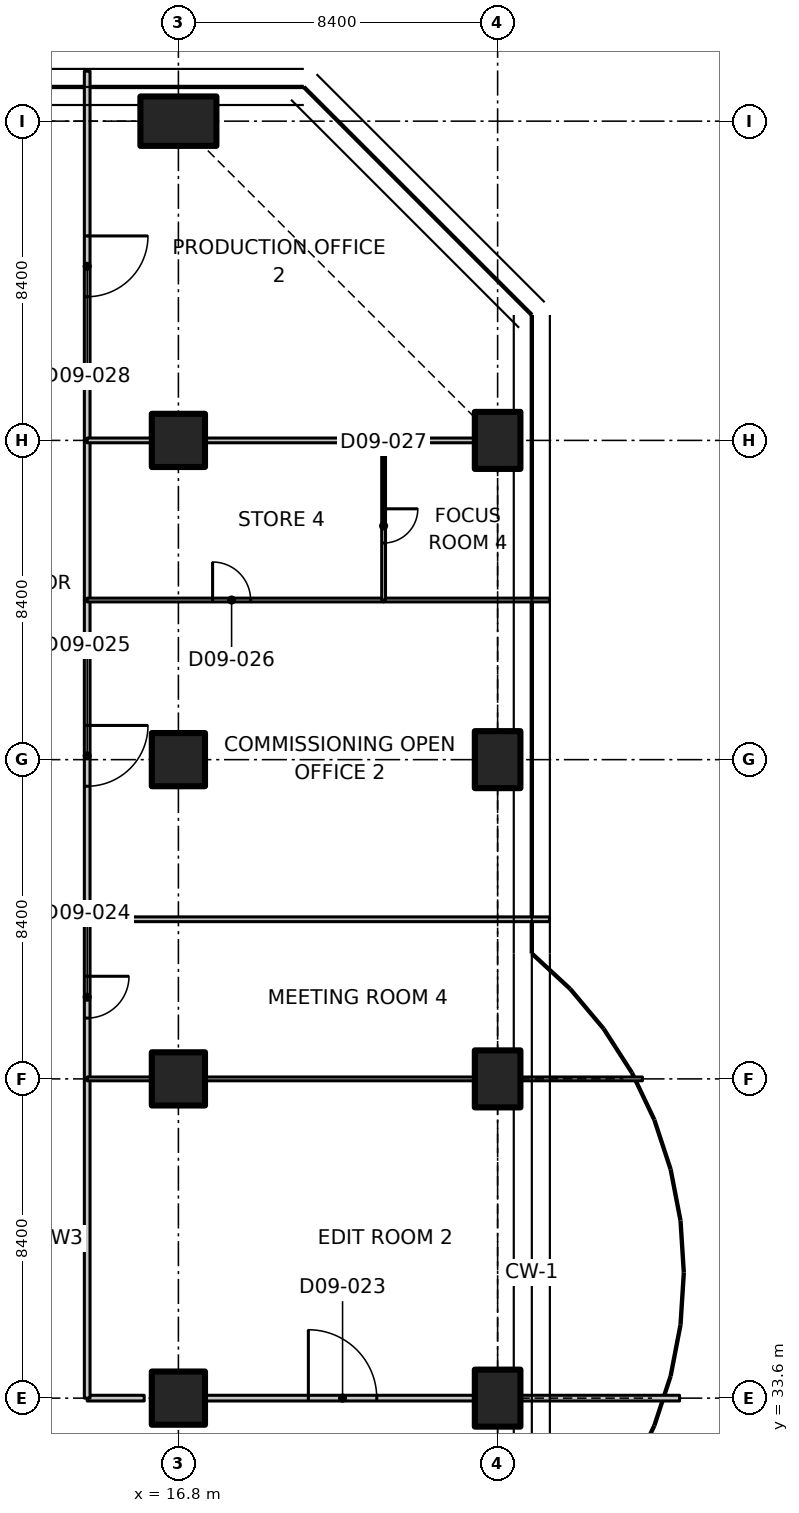
"""IFC4 building model, lengths in metres.
Left out: names, types, materials, properties, quantities, classifications, styles, units other than length and angle.
Written with IfcOpenShell. Run it as: python <this file> out.ifc"""

import sys

from ifc_helpers import new_model, si_unit, direction, frame, frame_2d, origin, origin_2d, place, context, subcontext, project, spatial, polyline, rectangle, outline, extrude, element, fill, save


model = new_model("IFC4")
c1 = context("Model", 3, precision=1e-05, world=origin(), true_north=direction((0.0, 1.0)))
c2 = subcontext(c1, "Body", "Model", "MODEL_VIEW")
j1 = project(units=[si_unit("LENGTHUNIT", "METRE"), si_unit("PLANEANGLEUNIT", "RADIAN")], contexts=[c1])
p1 = place(None, origin())
s1 = spatial("IfcSite", under=j1, at=p1, CompositionType="ELEMENT")
p2 = place(p1, origin())
s2 = spatial("IfcBuilding", under=s1, at=p2, CompositionType="ELEMENT")
p3 = place(p2, frame((0.0, 0.0, 61.7)))
s3 = spatial("IfcBuildingStorey", under=s2, at=p3, CompositionType="ELEMENT", Elevation=61.7)
for number, where, z_axis, x_axis in (
    (1, (16.8, 33.6, 0.0), (0.0, 0.0, 1.0), (1.0, 0.0, 0.0)),
    (2, (16.8, 42.0, 0.0), (0.0, 0.0, 1.0), (1.0, 0.0, 0.0)),
    (3, (16.8, 50.4, 0.0), (0.0, 0.0, 1.0), (1.0, 0.0, 0.0)),
    (4, (16.8, 58.8, 0.0), (0.0, 0.0, 1.0), (1.0, 0.0, 0.0)),
):
    element("IfcColumn", number, at=place(p3, frame(where, z_axis=z_axis, x_axis=x_axis)), inside=s3, PredefinedType="COLUMN", context=c2, shape_type="SweptSolid", body=[
        extrude(rectangle(XDim=1.4, YDim=1.4, at=origin_2d()), origin(), (0.0, 0.0, 1.0), 3.35),
    ])
p4 = place(p3, frame((16.8, 67.2, 0.0), z_axis=(0.0, 0.0, 1.0), x_axis=(0.0, 1.0, 0.0)))
e5 = element("IfcColumn", 5, at=p4, inside=s3, PredefinedType="COLUMN", context=c2, shape_type="SweptSolid", body=[
    extrude(rectangle(XDim=1.3, YDim=2.0, at=origin_2d()), origin(), (0.0, 0.0, 1.0), 3.35),
])
for number, where, z_axis, x_axis in (
    (6, (25.2, 33.6, 0.0), (0.0, 0.0, 1.0), (1.0, 0.0, 0.0)),
    (7, (25.2, 42.0, 0.0), (0.0, 0.0, 1.0), (1.0, 0.0, 0.0)),
    (8, (25.2, 50.4, 0.0), (0.0, 0.0, 1.0), (1.0, 0.0, 0.0)),
    (9, (25.2, 58.8, 0.0), (0.0, 0.0, 1.0), (1.0, 0.0, 0.0)),
):
    element("IfcColumn", number, at=place(p3, frame(where, z_axis=z_axis, x_axis=x_axis)), inside=s3, PredefinedType="COLUMN", context=c2, shape_type="SweptSolid", body=[
        extrude(rectangle(XDim=1.2, YDim=1.5, at=origin_2d()), origin(), (0.0, 0.0, 1.0), 3.35),
    ])
p5 = place(p3, frame((14.4, 33.6, 0.0), z_axis=(0.0, 0.0, 1.0), x_axis=(1.0, 0.0, 0.0)))
e10 = element("IfcWall", 10, at=p5, inside=s3, PredefinedType="PARTITIONING", context=c2, shape_type="SweptSolid", body=[
    extrude(rectangle(XDim=1.5, YDim=0.15, at=frame_2d((0.75, 0.0))), origin(), (0.0, 0.0, 1.0), 3.33),
])
p6 = place(p3, frame((17.52, 33.6, 0.0), z_axis=(0.0, 0.0, 1.0), x_axis=(1.0, 0.0, 0.0)))
e11 = element("IfcWall", 11, at=p6, inside=s3, PredefinedType="PARTITIONING", context=c2, shape_type="SweptSolid", body=[
    extrude(rectangle(XDim=7.06, YDim=0.15, at=frame_2d((3.53, 0.0))), origin(), (0.0, 0.0, 1.0), 3.33),
])
p7 = place(p6, frame((2.7, 0.0, 0.0)))
e12 = element("IfcOpeningElement", 12, at=p7, cuts=e11, PredefinedType="OPENING", context=c2, shape_type="SweptSolid", body=[
    extrude(rectangle(XDim=1.8, YDim=2.1, at=frame_2d((0.9, 1.05))), frame((0.0, 0.085, 0.0), z_axis=(0.0, -1.0, 0.0), x_axis=(1.0, 0.0, 0.0)), (0.0, 0.0, 1.0), 0.17),
])
p8 = place(p3, frame((25.82, 33.6, 0.0), z_axis=(0.0, 0.0, 1.0), x_axis=(1.0, 0.0, 0.0)))
e13 = element("IfcWall", 13, at=p8, inside=s3, PredefinedType="PARTITIONING", context=c2, shape_type="SweptSolid", body=[
    extrude(rectangle(XDim=4.168, YDim=0.15, at=frame_2d((2.084, 0.0))), origin(), (0.0, 0.0, 1.0), 2.98),
])
p9 = place(p3, frame((14.4, 42.0, 0.0), z_axis=(0.0, 0.0, 1.0), x_axis=(0.0, -1.0, 0.0)))
e14 = element("IfcWall", 14, at=p9, inside=s3, PredefinedType="PARTITIONING", context=c2, shape_type="SweptSolid", body=[
    extrude(rectangle(XDim=8.4, YDim=0.15, at=frame_2d((4.2, 0.0))), origin(), (0.0, 0.0, 1.0), 3.33),
])
p10 = place(p3, frame((14.4, 46.2, 0.0), z_axis=(0.0, 0.0, 1.0), x_axis=(0.0, -1.0, 0.0)))
e15 = element("IfcWall", 15, at=p10, inside=s3, PredefinedType="PARTITIONING", context=c2, shape_type="SweptSolid", body=[
    extrude(rectangle(XDim=4.2, YDim=0.15, at=frame_2d((2.1, 0.0))), origin(), (0.0, 0.0, 1.0), 3.33),
])
p11 = place(p10, frame((1.5, 0.0, 0.0)))
e16 = element("IfcOpeningElement", 16, at=p11, cuts=e15, PredefinedType="OPENING", context=c2, shape_type="SweptSolid", body=[
    extrude(rectangle(XDim=1.1, YDim=2.1, at=frame_2d((0.55, 1.05))), frame((0.0, 0.085, 0.0), z_axis=(0.0, -1.0, 0.0), x_axis=(1.0, 0.0, 0.0)), (0.0, 0.0, 1.0), 0.17),
])
p12 = place(p3, frame((14.4, 54.6, 0.0), z_axis=(0.0, 0.0, 1.0), x_axis=(0.0, -1.0, 0.0)))
e17 = element("IfcWall", 17, at=p12, inside=s3, PredefinedType="PARTITIONING", context=c2, shape_type="SweptSolid", body=[
    extrude(rectangle(XDim=8.4, YDim=0.15, at=frame_2d((4.2, 0.0))), origin(), (0.0, 0.0, 1.0), 3.33),
])
p13 = place(p12, frame((3.3, 0.0, 0.0)))
e18 = element("IfcOpeningElement", 18, at=p13, cuts=e17, PredefinedType="OPENING", context=c2, shape_type="SweptSolid", body=[
    extrude(rectangle(XDim=1.6, YDim=2.1, at=frame_2d((0.8, 1.05))), frame((0.0, 0.085, 0.0), z_axis=(0.0, -1.0, 0.0), x_axis=(1.0, 0.0, 0.0)), (0.0, 0.0, 1.0), 0.17),
])
p14 = place(p3, frame((14.4, 58.8, 0.0), z_axis=(0.0, 0.0, 1.0), x_axis=(0.0, -1.0, 0.0)))
e19 = element("IfcWall", 19, at=p14, inside=s3, PredefinedType="PARTITIONING", context=c2, shape_type="SweptSolid", body=[
    extrude(rectangle(XDim=4.2, YDim=0.15, at=frame_2d((2.1, 0.0))), origin(), (0.0, 0.0, 1.0), 3.33),
])
p15 = place(p3, frame((14.4, 68.514, 0.0), z_axis=(0.0, 0.0, 1.0), x_axis=(0.0, -1.0, 0.0)))
e20 = element("IfcWall", 20, at=p15, inside=s3, PredefinedType="PARTITIONING", context=c2, shape_type="SweptSolid", body=[
    extrude(outline(polyline([(0.0, 0.0), (9.714, 0.0), (9.714, 3.33), (1.764, 3.33), (1.762, 2.98), (0.866, 2.98), (0.864, 3.33), (0.234, 3.33), (0.0, 3.33), (0.0, 0.0)])), frame((0.0, 0.075, 0.0), z_axis=(0.0, -1.0, 0.0), x_axis=(1.0, 0.0, 0.0)), (0.0, 0.0, 1.0), 0.15),
])
p16 = place(p15, frame((4.334, 0.0, 0.0)))
e21 = element("IfcOpeningElement", 21, at=p16, cuts=e20, PredefinedType="OPENING", context=c2, shape_type="SweptSolid", body=[
    extrude(rectangle(XDim=1.6, YDim=2.1, at=frame_2d((0.8, 1.05))), frame((0.0, 0.085, 0.0), z_axis=(0.0, -1.0, 0.0), x_axis=(1.0, 0.0, 0.0)), (0.0, 0.0, 1.0), 0.17),
])
p17 = place(p3, frame((14.4, 42.0, 0.0), z_axis=(0.0, 0.0, 1.0), x_axis=(1.0, 0.0, 0.0)))
e22 = element("IfcWall", 22, at=p17, inside=s3, PredefinedType="PARTITIONING", context=c2, shape_type="SweptSolid", body=[
    extrude(rectangle(XDim=1.68, YDim=0.1, at=frame_2d((0.84, 0.0))), origin(), (0.0, 0.0, 1.0), 3.33),
])
p18 = place(p3, frame((17.52, 42.0, 0.0), z_axis=(0.0, 0.0, 1.0), x_axis=(1.0, 0.0, 0.0)))
e23 = element("IfcWall", 23, at=p18, inside=s3, PredefinedType="PARTITIONING", context=c2, shape_type="SweptSolid", body=[
    extrude(rectangle(XDim=7.06, YDim=0.1, at=frame_2d((3.53, 0.0))), origin(), (0.0, 0.0, 1.0), 3.33),
])
p19 = place(p3, frame((25.82, 42.0, 0.0), z_axis=(0.0, 0.0, 1.0), x_axis=(1.0, 0.0, 0.0)))
e24 = element("IfcWall", 24, at=p19, inside=s3, PredefinedType="PARTITIONING", context=c2, shape_type="SweptSolid", body=[
    extrude(rectangle(XDim=3.191, YDim=0.1, at=frame_2d((1.596, 0.0))), origin(), (0.0, 0.0, 1.0), 2.98),
])
p20 = place(p3, frame((14.4, 46.2, 0.0), z_axis=(0.0, 0.0, 1.0), x_axis=(1.0, 0.0, 0.0)))
e25 = element("IfcWall", 25, at=p20, inside=s3, PredefinedType="PARTITIONING", context=c2, shape_type="SweptSolid", body=[
    extrude(outline(polyline([(0.0, 0.0), (12.165, 0.0), (12.165, 3.33), (11.9, 3.33), (11.25, 3.33), (11.248, 2.98), (10.352, 2.98), (10.35, 3.33), (0.0, 3.33), (0.0, 0.0)])), frame((0.0, 0.062, 0.0), z_axis=(0.0, -1.0, 0.0), x_axis=(1.0, 0.0, 0.0)), (0.0, 0.0, 1.0), 0.125),
])
p21 = place(p3, frame((14.4, 54.6, 0.0), z_axis=(0.0, 0.0, 1.0), x_axis=(1.0, 0.0, 0.0)))
e26 = element("IfcWall", 26, at=p21, inside=s3, PredefinedType="PARTITIONING", context=c2, shape_type="SweptSolid", body=[
    extrude(rectangle(XDim=7.8, YDim=0.1, at=frame_2d((3.9, 0.0))), origin(), (0.0, 0.0, 1.0), 3.33),
])
p22 = place(p21, frame((3.3, 0.0, 0.0)))
e27 = element("IfcOpeningElement", 27, at=p22, cuts=e26, PredefinedType="OPENING", context=c2, shape_type="SweptSolid", body=[
    extrude(rectangle(XDim=1.0, YDim=2.1, at=frame_2d((0.5, 1.05))), frame((0.0, 0.06, 0.0), z_axis=(0.0, -1.0, 0.0), x_axis=(1.0, 0.0, 0.0)), (0.0, 0.0, 1.0), 0.12),
])
p23 = place(p3, frame((22.2, 54.6, 0.0), z_axis=(0.0, 0.0, 1.0), x_axis=(1.0, 0.0, 0.0)))
e28 = element("IfcWall", 28, at=p23, inside=s3, PredefinedType="PARTITIONING", context=c2, shape_type="SweptSolid", body=[
    extrude(rectangle(XDim=4.365, YDim=0.1, at=frame_2d((2.183, 0.0))), origin(), (0.0, 0.0, 1.0), 2.98),
])
p24 = place(p3, frame((22.2, 58.8, 0.0), z_axis=(0.0, 0.0, 1.0), x_axis=(0.0, -1.0, 0.0)))
e29 = element("IfcWall", 29, at=p24, inside=s3, PredefinedType="PARTITIONING", context=c2, shape_type="SweptSolid", body=[
    extrude(rectangle(XDim=4.2, YDim=0.1, at=frame_2d((2.1, 0.0))), origin(), (0.0, 0.0, 1.0), 3.33),
])
p25 = place(p24, frame((1.8, 0.0, 0.0)))
e30 = element("IfcOpeningElement", 30, at=p25, cuts=e29, PredefinedType="OPENING", context=c2, shape_type="SweptSolid", body=[
    extrude(rectangle(XDim=0.9, YDim=2.1, at=frame_2d((0.45, 1.05))), frame((0.0, 0.06, 0.0), z_axis=(0.0, -1.0, 0.0), x_axis=(1.0, 0.0, 0.0)), (0.0, 0.0, 1.0), 0.12),
])
p26 = place(p3, frame((14.4, 58.8, 0.0), z_axis=(0.0, 0.0, 1.0), x_axis=(1.0, 0.0, 0.0)))
e31 = element("IfcWall", 31, at=p26, inside=s3, PredefinedType="PARTITIONING", context=c2, shape_type="SweptSolid", body=[
    extrude(rectangle(XDim=1.68, YDim=0.125, at=frame_2d((0.84, 0.0))), origin(), (0.0, 0.0, 1.0), 3.33),
])
p27 = place(p3, frame((17.52, 58.8, 0.0), z_axis=(0.0, 0.0, 1.0), x_axis=(1.0, 0.0, 0.0)))
e32 = element("IfcWall", 32, at=p27, inside=s3, PredefinedType="PARTITIONING", context=c2, shape_type="SweptSolid", body=[
    extrude(rectangle(XDim=4.68, YDim=0.125, at=frame_2d((2.34, 0.0))), origin(), (0.0, 0.0, 1.0), 3.33),
])
p28 = place(p3, frame((22.2, 58.8, 0.0), z_axis=(0.0, 0.0, 1.0), x_axis=(1.0, 0.0, 0.0)))
e33 = element("IfcWall", 33, at=p28, inside=s3, PredefinedType="PARTITIONING", context=c2, shape_type="SweptSolid", body=[
    extrude(rectangle(XDim=2.38, YDim=0.125, at=frame_2d((1.19, 0.0))), origin(), (0.0, 0.0, 1.0), 3.33),
])
p29 = place(p7, origin())
e34 = element("IfcDoor", 34, at=p29, inside=s3, OperationType="DOUBLE_DOOR_SINGLE_SWING", PredefinedType="DOOR", context=c2, shape_type="SweptSolid", body=[
    extrude(rectangle(XDim=1.8, YDim=2.1, at=frame_2d((0.9, 1.05))), frame((0.0, 0.025, 0.0), z_axis=(0.0, -1.0, 0.0), x_axis=(1.0, 0.0, 0.0)), (0.0, 0.0, 1.0), 0.05),
])
fill(e12, e34)
p30 = place(p11, origin())
e35 = element("IfcDoor", 35, at=p30, inside=s3, OperationType="SINGLE_SWING_LEFT", PredefinedType="DOOR", context=c2, shape_type="SweptSolid", body=[
    extrude(rectangle(XDim=1.1, YDim=2.1, at=frame_2d((0.55, 1.05))), frame((0.0, 0.025, 0.0), z_axis=(0.0, -1.0, 0.0), x_axis=(1.0, 0.0, 0.0)), (0.0, 0.0, 1.0), 0.05),
])
fill(e16, e35)
p31 = place(p13, origin())
e36 = element("IfcDoor", 36, at=p31, inside=s3, OperationType="DOUBLE_DOOR_SINGLE_SWING", PredefinedType="DOOR", context=c2, shape_type="SweptSolid", body=[
    extrude(rectangle(XDim=1.6, YDim=2.1, at=frame_2d((0.8, 1.05))), frame((0.0, 0.025, 0.0), z_axis=(0.0, -1.0, 0.0), x_axis=(1.0, 0.0, 0.0)), (0.0, 0.0, 1.0), 0.05),
])
fill(e18, e36)
p32 = place(p22, origin())
e37 = element("IfcDoor", 37, at=p32, inside=s3, OperationType="SINGLE_SWING_LEFT", PredefinedType="DOOR", context=c2, shape_type="SweptSolid", body=[
    extrude(rectangle(XDim=1.0, YDim=2.1, at=frame_2d((0.5, 1.05))), frame((0.0, 0.025, 0.0), z_axis=(0.0, -1.0, 0.0), x_axis=(1.0, 0.0, 0.0)), (0.0, 0.0, 1.0), 0.05),
])
fill(e27, e37)
p33 = place(p25, origin())
e38 = element("IfcDoor", 38, at=p33, inside=s3, OperationType="SINGLE_SWING_LEFT", PredefinedType="DOOR", context=c2, shape_type="SweptSolid", body=[
    extrude(rectangle(XDim=0.9, YDim=2.1, at=frame_2d((0.45, 1.05))), frame((0.0, 0.025, 0.0), z_axis=(0.0, -1.0, 0.0), x_axis=(1.0, 0.0, 0.0)), (0.0, 0.0, 1.0), 0.05),
])
fill(e30, e38)
p34 = place(p16, origin())
e39 = element("IfcDoor", 39, at=p34, inside=s3, OperationType="DOUBLE_DOOR_SINGLE_SWING", PredefinedType="DOOR", context=c2, shape_type="SweptSolid", body=[
    extrude(rectangle(XDim=1.6, YDim=2.1, at=frame_2d((0.8, 1.05))), frame((0.0, 0.025, 0.0), z_axis=(0.0, -1.0, 0.0), x_axis=(1.0, 0.0, 0.0)), (0.0, 0.0, 1.0), 0.05),
])
fill(e21, e39)
save(model, sys.argv[1])
